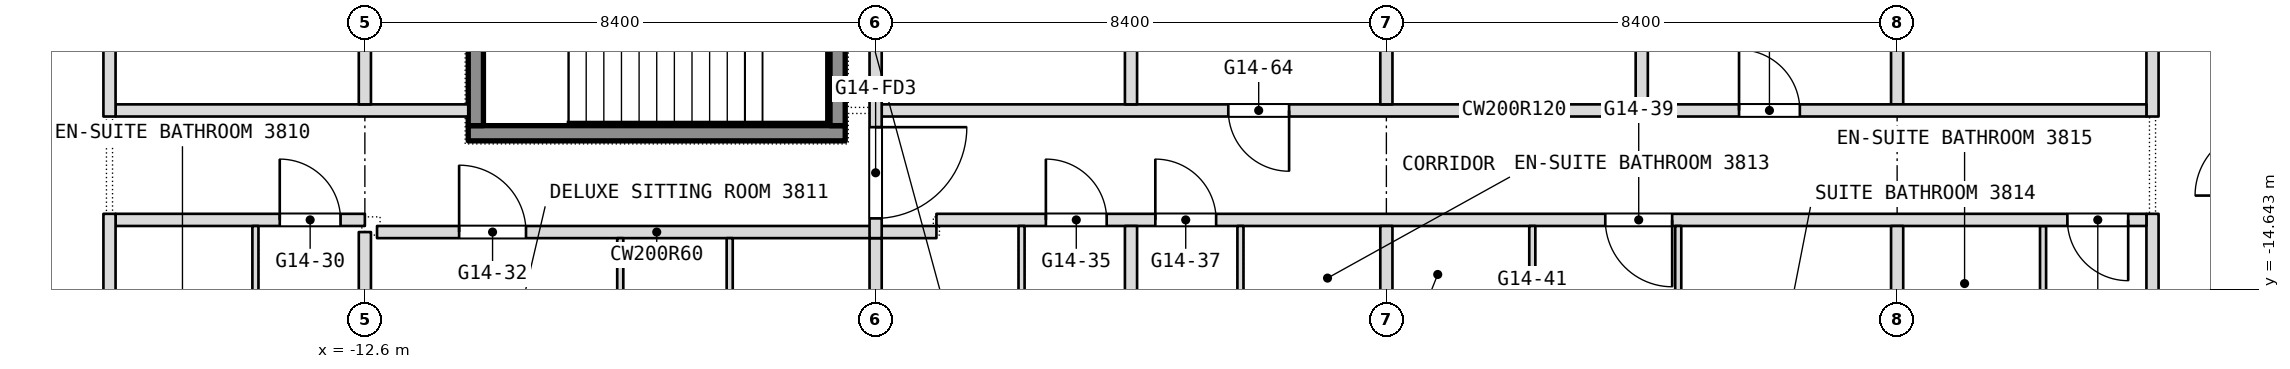
"""IFC4 building model, lengths in metres.
Left out: names, types, materials, properties, quantities, classifications, styles, units other than length and angle.
Written with IfcOpenShell. Run it as: python <this file> out.ifc"""

import sys

from ifc_helpers import new_model, si_unit, direction, frame, frame_2d, origin, place, context, subcontext, project, spatial, rectangle, extrude, element, fill, save


model = new_model("IFC4")
c1 = context("Model", 3, precision=1e-05, world=origin(), true_north=direction((0.0, 1.0)))
c2 = subcontext(c1, "Body", "Model", "MODEL_VIEW")
j1 = project(units=[si_unit("LENGTHUNIT", "METRE"), si_unit("PLANEANGLEUNIT", "RADIAN")], contexts=[c1])
p1 = place(None, origin())
s1 = spatial("IfcSite", under=j1, at=p1, CompositionType="ELEMENT")
p2 = place(p1, origin())
s2 = spatial("IfcBuilding", under=s1, at=p2, CompositionType="ELEMENT")
p3 = place(p2, frame((0.0, 0.0, 162.5)))
s3 = spatial("IfcBuildingStorey", under=s2, at=p3, CompositionType="ELEMENT", Elevation=162.5)
p4 = place(p3, frame((16.8, -22.186, 0.0), z_axis=(0.0, 0.0, 1.0), x_axis=(0.0, 1.0, 0.0)))
e1 = element("IfcWall", 1, at=p4, inside=s3, PredefinedType="PARTITIONING", context=c2, shape_type="SweptSolid", body=[
    extrude(rectangle(XDim=8.786, YDim=0.2, at=frame_2d((4.393, 0.0))), origin(), (0.0, 0.0, 1.0), 3.34),
])
p5 = place(p3, frame((16.8, -11.8, 0.0), z_axis=(0.0, 0.0, 1.0), x_axis=(0.0, 1.0, 0.0)))
e2 = element("IfcWall", 2, at=p5, inside=s3, PredefinedType="PARTITIONING", context=c2, shape_type="SweptSolid", body=[
    extrude(rectangle(XDim=9.9, YDim=0.2, at=frame_2d((4.95, 0.0))), origin(), (0.0, 0.0, 1.0), 3.34),
])
p6 = place(p3, frame((15.0, -16.45, 0.0), z_axis=(0.0, 0.0, 1.0), x_axis=(0.0, 1.0, 0.0)))
e3 = element("IfcWall", 3, at=p6, inside=s3, PredefinedType="PARTITIONING", context=c2, shape_type="SweptSolid", body=[
    extrude(rectangle(XDim=2.85, YDim=0.1, at=frame_2d((1.425, 0.0))), origin(), (0.0, 0.0, 1.0), 3.34),
])
p7 = place(p3, frame((-12.4, -13.7, 0.0), z_axis=(0.0, 0.0, 1.0), x_axis=(1.0, 0.0, 0.0)))
e4 = element("IfcWall", 4, at=p7, inside=s3, PredefinedType="PARTITIONING", context=c2, shape_type="SweptSolid", body=[
    extrude(rectangle(XDim=9.2, YDim=0.2, at=frame_2d((4.6, 0.0))), origin(), (0.0, 0.0, 1.0), 3.34),
])
p8 = place(p7, frame((1.35, 0.0, 0.0)))
e5 = element("IfcOpeningElement", 5, at=p8, cuts=e4, PredefinedType="OPENING", context=c2, shape_type="SweptSolid", body=[
    extrude(rectangle(XDim=1.1, YDim=2.1, at=frame_2d((0.55, 1.05))), frame((0.0, 0.1, 0.0), z_axis=(0.0, -1.0, 0.0), x_axis=(1.0, 0.0, 0.0)), (0.0, 0.0, 1.0), 0.2),
])
p9 = place(p3, frame((-16.7, -13.5, 0.0), z_axis=(0.0, 0.0, 1.0), x_axis=(1.0, 0.0, 0.0)))
e6 = element("IfcWall", 6, at=p9, inside=s3, PredefinedType="PARTITIONING", context=c2, shape_type="SweptSolid", body=[
    extrude(rectangle(XDim=4.1, YDim=0.2, at=frame_2d((2.05, 0.0))), origin(), (0.0, 0.0, 1.0), 3.34),
])
p10 = place(p9, frame((2.7, 0.0, 0.0)))
e7 = element("IfcOpeningElement", 7, at=p10, cuts=e6, PredefinedType="OPENING", context=c2, shape_type="SweptSolid", body=[
    extrude(rectangle(XDim=1.0, YDim=2.1, at=frame_2d((0.5, 1.05))), frame((0.0, 0.1, 0.0), z_axis=(0.0, -1.0, 0.0), x_axis=(1.0, 0.0, 0.0)), (0.0, 0.0, 1.0), 0.2),
])
p11 = place(p3, frame((-3.2, -13.5, 0.0), z_axis=(0.0, 0.0, 1.0), x_axis=(1.0, 0.0, 0.0)))
e8 = element("IfcWall", 8, at=p11, inside=s3, PredefinedType="PARTITIONING", context=c2, shape_type="SweptSolid", body=[
    extrude(rectangle(XDim=19.9, YDim=0.2, at=frame_2d((9.95, 0.0))), origin(), (0.0, 0.0, 1.0), 3.34),
])
p12 = place(p11, frame((1.8, 0.0, 0.0)))
e9 = element("IfcOpeningElement", 9, at=p12, cuts=e8, PredefinedType="OPENING", context=c2, shape_type="SweptSolid", body=[
    extrude(rectangle(XDim=1.0, YDim=2.1, at=frame_2d((0.5, 1.05))), frame((0.0, 0.1, 0.0), z_axis=(0.0, -1.0, 0.0), x_axis=(1.0, 0.0, 0.0)), (0.0, 0.0, 1.0), 0.2),
])
p13 = place(p11, frame((3.6, 0.0, 0.0)))
e10 = element("IfcOpeningElement", 10, at=p13, cuts=e8, PredefinedType="OPENING", context=c2, shape_type="SweptSolid", body=[
    extrude(rectangle(XDim=1.0, YDim=2.1, at=frame_2d((0.5, 1.05))), frame((0.0, 0.1, 0.0), z_axis=(0.0, -1.0, 0.0), x_axis=(1.0, 0.0, 0.0)), (0.0, 0.0, 1.0), 0.2),
])
p14 = place(p11, frame((11.0, 0.0, 0.0)))
e11 = element("IfcOpeningElement", 11, at=p14, cuts=e8, PredefinedType="OPENING", context=c2, shape_type="SweptSolid", body=[
    extrude(rectangle(XDim=1.1, YDim=2.1, at=frame_2d((0.55, 1.05))), frame((0.0, 0.1, 0.0), z_axis=(0.0, -1.0, 0.0), x_axis=(1.0, 0.0, 0.0)), (0.0, 0.0, 1.0), 0.2),
])
p15 = place(p11, frame((18.6, 0.0, 0.0)))
e12 = element("IfcOpeningElement", 12, at=p15, cuts=e8, PredefinedType="OPENING", context=c2, shape_type="SweptSolid", body=[
    extrude(rectangle(XDim=1.0, YDim=2.1, at=frame_2d((0.5, 1.05))), frame((0.0, 0.1, 0.0), z_axis=(0.0, -1.0, 0.0), x_axis=(1.0, 0.0, 0.0)), (0.0, 0.0, 1.0), 0.2),
])
p16 = place(p3, frame((12.6, -21.175, 0.0), z_axis=(0.0, 0.0, 1.0), x_axis=(0.0, 1.0, 0.0)))
e13 = element("IfcWall", 13, at=p16, inside=s3, PredefinedType="PARTITIONING", context=c2, shape_type="SweptSolid", body=[
    extrude(rectangle(XDim=7.575, YDim=0.2, at=frame_2d((3.788, 0.0))), origin(), (0.0, 0.0, 1.0), 3.34),
])
p17 = place(p3, frame((12.6, -11.6, 0.0), z_axis=(0.0, 0.0, 1.0), x_axis=(0.0, 1.0, 0.0)))
e14 = element("IfcWall", 14, at=p17, inside=s3, PredefinedType="PARTITIONING", context=c2, shape_type="SweptSolid", body=[
    extrude(rectangle(XDim=3.9, YDim=0.2, at=frame_2d((1.95, 0.0))), origin(), (0.0, 0.0, 1.0), 3.34),
])
p18 = place(p3, frame((-16.7, -11.7, 0.0), z_axis=(0.0, 0.0, 1.0), x_axis=(1.0, 0.0, 0.0)))
e15 = element("IfcWall", 15, at=p18, inside=s3, PredefinedType="PARTITIONING", context=c2, shape_type="SweptSolid", body=[
    extrude(rectangle(XDim=5.8, YDim=0.2, at=frame_2d((2.9, 0.0))), origin(), (0.0, 0.0, 1.0), 3.34),
])
p19 = place(p3, frame((-4.1, -11.7, 0.0), z_axis=(0.0, 0.0, 1.0), x_axis=(1.0, 0.0, 0.0)))
e16 = element("IfcWall", 16, at=p19, inside=s3, PredefinedType="PARTITIONING", context=c2, shape_type="SweptSolid", body=[
    extrude(rectangle(XDim=20.8, YDim=0.2, at=frame_2d((10.4, 0.0))), origin(), (0.0, 0.0, 1.0), 3.34),
])
p20 = place(p19, frame((14.1, 0.0, 0.0)))
e17 = element("IfcOpeningElement", 17, at=p20, cuts=e16, PredefinedType="OPENING", context=c2, shape_type="SweptSolid", body=[
    extrude(rectangle(XDim=1.0, YDim=2.1, at=frame_2d((0.5, 1.05))), frame((0.0, 0.1, 0.0), z_axis=(0.0, -1.0, 0.0), x_axis=(1.0, 0.0, 0.0)), (0.0, 0.0, 1.0), 0.2),
])
p21 = place(p19, frame((5.7, 0.0, 0.0)))
e18 = element("IfcOpeningElement", 18, at=p21, cuts=e16, PredefinedType="OPENING", context=c2, shape_type="SweptSolid", body=[
    extrude(rectangle(XDim=1.0, YDim=2.1, at=frame_2d((0.5, 1.05))), frame((0.0, 0.1, 0.0), z_axis=(0.0, -1.0, 0.0), x_axis=(1.0, 0.0, 0.0)), (0.0, 0.0, 1.0), 0.2),
])
p22 = place(p3, frame((9.0, -18.05, 0.0), z_axis=(0.0, 0.0, 1.0), x_axis=(0.0, 1.0, 0.0)))
e19 = element("IfcWall", 19, at=p22, inside=s3, PredefinedType="PARTITIONING", context=c2, shape_type="SweptSolid", body=[
    extrude(rectangle(XDim=4.45, YDim=0.1, at=frame_2d((2.225, 0.0))), origin(), (0.0, 0.0, 1.0), 3.34),
])
p23 = place(p3, frame((8.4, -11.6, 0.0), z_axis=(0.0, 0.0, 1.0), x_axis=(0.0, 1.0, 0.0)))
e20 = element("IfcWall", 20, at=p23, inside=s3, PredefinedType="PARTITIONING", context=c2, shape_type="SweptSolid", body=[
    extrude(rectangle(XDim=3.8, YDim=0.2, at=frame_2d((1.9, 0.0))), origin(), (0.0, 0.0, 1.0), 3.34),
])
p24 = place(p3, frame((6.6, -17.05, 0.0), z_axis=(0.0, 0.0, 1.0), x_axis=(0.0, 1.0, 0.0)))
e21 = element("IfcWall", 21, at=p24, inside=s3, PredefinedType="PARTITIONING", context=c2, shape_type="SweptSolid", body=[
    extrude(rectangle(XDim=3.45, YDim=0.1, at=frame_2d((1.725, 0.0))), origin(), (0.0, 0.0, 1.0), 3.34),
])
p25 = place(p24, frame((1.12, 0.0, 0.0)))
e22 = element("IfcOpeningElement", 22, at=p25, cuts=e21, PredefinedType="OPENING", context=c2, shape_type="SweptSolid", body=[
    extrude(rectangle(XDim=0.9, YDim=2.1, at=frame_2d((0.45, 1.05))), frame((0.0, 0.05, 0.0), z_axis=(0.0, -1.0, 0.0), x_axis=(1.0, 0.0, 0.0)), (0.0, 0.0, 1.0), 0.1),
])
p26 = place(p3, frame((4.2, -23.3, 0.0), z_axis=(0.0, 0.0, 1.0), x_axis=(0.0, 1.0, 0.0)))
e23 = element("IfcWall", 23, at=p26, inside=s3, PredefinedType="PARTITIONING", context=c2, shape_type="SweptSolid", body=[
    extrude(rectangle(XDim=9.7, YDim=0.2, at=frame_2d((4.85, 0.0))), origin(), (0.0, 0.0, 1.0), 3.34),
])
p27 = place(p3, frame((4.2, -11.6, 0.0), z_axis=(0.0, 0.0, 1.0), x_axis=(0.0, 1.0, 0.0)))
e24 = element("IfcWall", 24, at=p27, inside=s3, PredefinedType="PARTITIONING", context=c2, shape_type="SweptSolid", body=[
    extrude(rectangle(XDim=9.7, YDim=0.2, at=frame_2d((4.85, 0.0))), origin(), (0.0, 0.0, 1.0), 3.34),
])
p28 = place(p3, frame((1.8, -16.35, 0.0), z_axis=(0.0, 0.0, 1.0), x_axis=(0.0, 1.0, 0.0)))
e25 = element("IfcWall", 25, at=p28, inside=s3, PredefinedType="PARTITIONING", context=c2, shape_type="SweptSolid", body=[
    extrude(rectangle(XDim=2.75, YDim=0.1, at=frame_2d((1.375, 0.0))), origin(), (0.0, 0.0, 1.0), 3.34),
])
p29 = place(p3, frame((0.0, -23.3, 0.0), z_axis=(0.0, 0.0, 1.0), x_axis=(0.0, 1.0, 0.0)))
e26 = element("IfcWall", 26, at=p29, inside=s3, PredefinedType="PARTITIONING", context=c2, shape_type="SweptSolid", body=[
    extrude(rectangle(XDim=9.7, YDim=0.2, at=frame_2d((4.85, 0.0))), origin(), (0.0, 0.0, 1.0), 3.34),
])
p30 = place(p3, frame((0.0, -11.6, 0.0), z_axis=(0.0, 0.0, 1.0), x_axis=(0.0, 1.0, 0.0)))
e27 = element("IfcWall", 27, at=p30, inside=s3, PredefinedType="PARTITIONING", context=c2, shape_type="SweptSolid", body=[
    extrude(rectangle(XDim=9.7, YDim=0.2, at=frame_2d((4.85, 0.0))), origin(), (0.0, 0.0, 1.0), 3.34),
])
p31 = place(p3, frame((-1.8, -17.35, 0.0), z_axis=(0.0, 0.0, 1.0), x_axis=(0.0, 1.0, 0.0)))
e28 = element("IfcWall", 28, at=p31, inside=s3, PredefinedType="PARTITIONING", context=c2, shape_type="SweptSolid", body=[
    extrude(rectangle(XDim=3.75, YDim=0.1, at=frame_2d((1.875, 0.0))), origin(), (0.0, 0.0, 1.0), 3.34),
])
p32 = place(p3, frame((-4.2, -23.3, 0.0), z_axis=(0.0, 0.0, 1.0), x_axis=(0.0, 1.0, 0.0)))
e29 = element("IfcWall", 29, at=p32, inside=s3, PredefinedType="PARTITIONING", context=c2, shape_type="SweptSolid", body=[
    extrude(rectangle(XDim=9.5, YDim=0.2, at=frame_2d((4.75, 0.0))), origin(), (0.0, 0.0, 1.0), 3.34),
])
p33 = place(p3, frame((-4.2, -13.8, 0.0), z_axis=(0.0, 0.0, 1.0), x_axis=(0.0, 1.0, 0.0)))
e30 = element("IfcWall", 30, at=p33, inside=s3, PredefinedType="PARTITIONING", context=c2, shape_type="SweptSolid", body=[
    extrude(rectangle(XDim=13.8, YDim=0.2, at=frame_2d((6.9, 0.0))), origin(), (0.0, 0.0, 1.0), 3.34),
])
p34 = place(p33, frame((12.15, 0.0, 0.0)))
e31 = element("IfcOpeningElement", 31, at=p34, cuts=e30, PredefinedType="OPENING", context=c2, shape_type="SweptSolid", body=[
    extrude(rectangle(XDim=1.5, YDim=2.1, at=frame_2d((0.75, 1.05))), frame((0.0, 0.1, 0.0), z_axis=(0.0, -1.0, 0.0), x_axis=(1.0, 0.0, 0.0)), (0.0, 0.0, 1.0), 0.2),
])
p35 = place(p33, frame((0.325, 0.0, 0.0)))
e32 = element("IfcOpeningElement", 32, at=p35, cuts=e30, PredefinedType="OPENING", context=c2, shape_type="SweptSolid", body=[
    extrude(rectangle(XDim=1.5, YDim=2.1, at=frame_2d((0.75, 1.05))), frame((0.0, 0.1, 0.0), z_axis=(0.0, -1.0, 0.0), x_axis=(1.0, 0.0, 0.0)), (0.0, 0.0, 1.0), 0.2),
])
p36 = place(p3, frame((-6.6, -17.35, 0.0), z_axis=(0.0, 0.0, 1.0), x_axis=(0.0, 1.0, 0.0)))
e33 = element("IfcWall", 33, at=p36, inside=s3, PredefinedType="PARTITIONING", context=c2, shape_type="SweptSolid", body=[
    extrude(rectangle(XDim=3.55, YDim=0.1, at=frame_2d((1.775, 0.0))), origin(), (0.0, 0.0, 1.0), 3.34),
])
p37 = place(p3, frame((-8.4, -23.3, 0.0), z_axis=(0.0, 0.0, 1.0), x_axis=(0.0, 1.0, 0.0)))
e34 = element("IfcWall", 34, at=p37, inside=s3, PredefinedType="PARTITIONING", context=c2, shape_type="SweptSolid", body=[
    extrude(rectangle(XDim=9.5, YDim=0.1, at=frame_2d((4.75, 0.0))), origin(), (0.0, 0.0, 1.0), 3.34),
])
p38 = place(p37, frame((3.57, 0.0, 0.0)))
e35 = element("IfcOpeningElement", 35, at=p38, cuts=e34, PredefinedType="OPENING", context=c2, shape_type="SweptSolid", body=[
    extrude(rectangle(XDim=0.9, YDim=2.1, at=frame_2d((0.45, 1.05))), frame((0.0, 0.05, 0.0), z_axis=(0.0, -1.0, 0.0), x_axis=(1.0, 0.0, 0.0)), (0.0, 0.0, 1.0), 0.1),
])
p39 = place(p3, frame((-12.6, -21.175, 0.0), z_axis=(0.0, 0.0, 1.0), x_axis=(0.0, 1.0, 0.0)))
e36 = element("IfcWall", 36, at=p39, inside=s3, PredefinedType="PARTITIONING", context=c2, shape_type="SweptSolid", body=[
    extrude(rectangle(XDim=7.475, YDim=0.2, at=frame_2d((3.738, 0.0))), origin(), (0.0, 0.0, 1.0), 3.34),
])
p40 = place(p3, frame((-12.6, -11.6, 0.0), z_axis=(0.0, 0.0, 1.0), x_axis=(0.0, 1.0, 0.0)))
e37 = element("IfcWall", 37, at=p40, inside=s3, PredefinedType="PARTITIONING", context=c2, shape_type="SweptSolid", body=[
    extrude(rectangle(XDim=9.7, YDim=0.2, at=frame_2d((4.85, 0.0))), origin(), (0.0, 0.0, 1.0), 3.34),
])
p41 = place(p3, frame((-14.4, -17.65, 0.0), z_axis=(0.0, 0.0, 1.0), x_axis=(0.0, 1.0, 0.0)))
e38 = element("IfcWall", 38, at=p41, inside=s3, PredefinedType="PARTITIONING", context=c2, shape_type="SweptSolid", body=[
    extrude(rectangle(XDim=4.05, YDim=0.1, at=frame_2d((2.025, 0.0))), origin(), (0.0, 0.0, 1.0), 3.34),
])
p42 = place(p3, frame((-16.8, -22.186, 0.0), z_axis=(0.0, 0.0, 1.0), x_axis=(0.0, 1.0, 0.0)))
e39 = element("IfcWall", 39, at=p42, inside=s3, PredefinedType="PARTITIONING", context=c2, shape_type="SweptSolid", body=[
    extrude(rectangle(XDim=8.786, YDim=0.2, at=frame_2d((4.393, 0.0))), origin(), (0.0, 0.0, 1.0), 3.34),
])
p43 = place(p3, frame((-16.8, -11.8, 0.0), z_axis=(0.0, 0.0, 1.0), x_axis=(0.0, 1.0, 0.0)))
e40 = element("IfcWall", 40, at=p43, inside=s3, PredefinedType="PARTITIONING", context=c2, shape_type="SweptSolid", body=[
    extrude(rectangle(XDim=9.9, YDim=0.2, at=frame_2d((4.95, 0.0))), origin(), (0.0, 0.0, 1.0), 3.34),
])
p44 = place(p3, frame((-10.9, -12.075, 0.1), z_axis=(0.0, 0.0, 1.0), x_axis=(1.0, 0.0, 0.0)))
e41 = element("IfcWall", 41, at=p44, inside=s3, PredefinedType="SHEAR", context=c2, shape_type="SweptSolid", body=[
    extrude(rectangle(XDim=6.2, YDim=0.25, at=frame_2d((3.1, 0.0))), origin(), (0.0, 0.0, 1.0), 3.6),
])
for number, where, z_axis, x_axis in (
    (42, (-10.775, -11.95, 0.1), (0.0, 0.0, 1.0), (0.0, 1.0, 0.0)),
    (43, (-4.825, -11.95, 0.1), (0.0, 0.0, 1.0), (0.0, 1.0, 0.0)),
):
    element("IfcWall", number, at=place(p3, frame(where, z_axis=z_axis, x_axis=x_axis)), inside=s3, PredefinedType="SHEAR", context=c2, shape_type="SweptSolid", body=[
        extrude(rectangle(XDim=2.9, YDim=0.25, at=frame_2d((1.45, 0.0))), origin(), (0.0, 0.0, 1.0), 3.6),
    ])
p45 = place(p8, origin())
e44 = element("IfcDoor", 44, at=p45, inside=s3, OperationType="SINGLE_SWING_RIGHT", PredefinedType="DOOR", context=c2, shape_type="SweptSolid", body=[
    extrude(rectangle(XDim=1.1, YDim=2.1, at=frame_2d((0.55, 1.05))), frame((0.0, 0.025, 0.0), z_axis=(0.0, -1.0, 0.0), x_axis=(1.0, 0.0, 0.0)), (0.0, 0.0, 1.0), 0.05),
])
fill(e5, e44)
p46 = place(p10, origin())
e45 = element("IfcDoor", 45, at=p46, inside=s3, OperationType="SINGLE_SWING_RIGHT", PredefinedType="DOOR", context=c2, shape_type="SweptSolid", body=[
    extrude(rectangle(XDim=1.0, YDim=2.1, at=frame_2d((0.5, 1.05))), frame((0.0, 0.025, 0.0), z_axis=(0.0, -1.0, 0.0), x_axis=(1.0, 0.0, 0.0)), (0.0, 0.0, 1.0), 0.05),
])
fill(e7, e45)
p47 = place(p12, origin())
e46 = element("IfcDoor", 46, at=p47, inside=s3, OperationType="SINGLE_SWING_LEFT", PredefinedType="DOOR", context=c2, shape_type="SweptSolid", body=[
    extrude(rectangle(XDim=1.0, YDim=2.1, at=frame_2d((0.5, 1.05))), frame((0.0, 0.025, 0.0), z_axis=(0.0, -1.0, 0.0), x_axis=(1.0, 0.0, 0.0)), (0.0, 0.0, 1.0), 0.05),
])
fill(e9, e46)
p48 = place(p13, origin())
e47 = element("IfcDoor", 47, at=p48, inside=s3, OperationType="SINGLE_SWING_LEFT", PredefinedType="DOOR", context=c2, shape_type="SweptSolid", body=[
    extrude(rectangle(XDim=1.0, YDim=2.1, at=frame_2d((0.5, 1.05))), frame((0.0, 0.025, 0.0), z_axis=(0.0, -1.0, 0.0), x_axis=(1.0, 0.0, 0.0)), (0.0, 0.0, 1.0), 0.05),
])
fill(e10, e47)
p49 = place(p14, origin())
e48 = element("IfcDoor", 48, at=p49, inside=s3, OperationType="SINGLE_SWING_LEFT", PredefinedType="DOOR", context=c2, shape_type="SweptSolid", body=[
    extrude(rectangle(XDim=1.1, YDim=2.1, at=frame_2d((0.55, 1.05))), frame((0.0, 0.025, 0.0), z_axis=(0.0, -1.0, 0.0), x_axis=(1.0, 0.0, 0.0)), (0.0, 0.0, 1.0), 0.05),
])
fill(e11, e48)
p50 = place(p15, origin())
e49 = element("IfcDoor", 49, at=p50, inside=s3, OperationType="SINGLE_SWING_LEFT", PredefinedType="DOOR", context=c2, shape_type="SweptSolid", body=[
    extrude(rectangle(XDim=1.0, YDim=2.1, at=frame_2d((0.5, 1.05))), frame((0.0, 0.025, 0.0), z_axis=(0.0, -1.0, 0.0), x_axis=(1.0, 0.0, 0.0)), (0.0, 0.0, 1.0), 0.05),
])
fill(e12, e49)
p51 = place(p20, origin())
e50 = element("IfcDoor", 50, at=p51, inside=s3, OperationType="SINGLE_SWING_RIGHT", PredefinedType="DOOR", context=c2, shape_type="SweptSolid", body=[
    extrude(rectangle(XDim=1.0, YDim=2.1, at=frame_2d((0.5, 1.05))), frame((0.0, 0.025, 0.0), z_axis=(0.0, -1.0, 0.0), x_axis=(1.0, 0.0, 0.0)), (0.0, 0.0, 1.0), 0.05),
])
fill(e17, e50)
p52 = place(p21, origin())
e51 = element("IfcDoor", 51, at=p52, inside=s3, OperationType="SINGLE_SWING_RIGHT", PredefinedType="DOOR", context=c2, shape_type="SweptSolid", body=[
    extrude(rectangle(XDim=1.0, YDim=2.1, at=frame_2d((0.5, 1.05))), frame((0.0, 0.025, 0.0), z_axis=(0.0, -1.0, 0.0), x_axis=(1.0, 0.0, 0.0)), (0.0, 0.0, 1.0), 0.05),
])
fill(e18, e51)
p53 = place(p35, origin())
e52 = element("IfcDoor", 52, at=p53, inside=s3, OperationType="DOUBLE_DOOR_DOUBLE_SWING", PredefinedType="DOOR", context=c2, shape_type="SweptSolid", body=[
    extrude(rectangle(XDim=1.5, YDim=2.1, at=frame_2d((0.75, 1.05))), frame((0.0, 0.025, 0.0), z_axis=(0.0, -1.0, 0.0), x_axis=(1.0, 0.0, 0.0)), (0.0, 0.0, 1.0), 0.05),
])
fill(e32, e52)
save(model, sys.argv[1])
